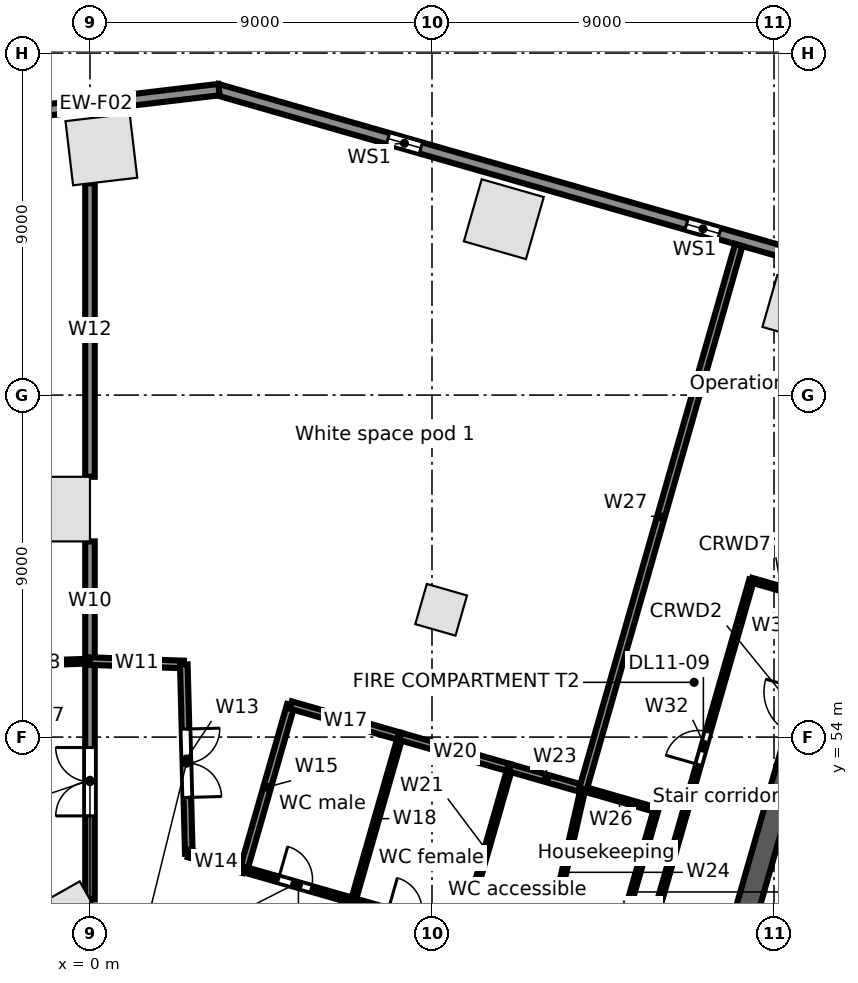
"""IFC4 building model, lengths in metres.
Left out: names, types, materials, properties, quantities, classifications, styles, units other than length and angle.
Written with IfcOpenShell. Run it as: python <this file> out.ifc"""

import sys

from ifc_helpers import new_model, si_unit, direction, frame, frame_2d, origin, origin_2d, place, context, subcontext, project, spatial, rectangle, extrude, element, fill, save


model = new_model("IFC4")
c1 = context("Model", 3, precision=1e-05, world=origin(), true_north=direction((0.0, 1.0)))
c2 = subcontext(c1, "Body", "Model", "MODEL_VIEW")
j1 = project(units=[si_unit("LENGTHUNIT", "METRE"), si_unit("PLANEANGLEUNIT", "RADIAN")], contexts=[c1])
p1 = place(None, origin())
s1 = spatial("IfcSite", under=j1, at=p1, CompositionType="ELEMENT")
p2 = place(p1, origin())
s2 = spatial("IfcBuilding", under=s1, at=p2, CompositionType="ELEMENT")
p3 = place(p2, frame((0.0, 0.0, 56.5)))
s3 = spatial("IfcBuildingStorey", under=s2, at=p3, CompositionType="ELEMENT", Elevation=56.5)
for number, where, z_axis, x_axis in (
    (1, (18.746, 65.376, 0.0), (0.0, 0.0, 1.0), (-0.961, 0.276, 0.0)),
    (2, (10.89, 67.629, 0.0), (0.0, 0.0, 1.0), (-0.961, 0.276, 0.0)),
    (3, (0.3, 69.464, 0.0), (0.0, 0.0, 1.0), (-0.993, -0.118, 0.0)),
    (4, (-0.591, 49.044, 0.0), (0.0, 0.0, 1.0), (0.87, 0.492, 0.0)),
    (5, (-0.85, 60.0, 0.0), (0.0, 0.0, 1.0), (0.0, 1.0, 0.0)),
):
    element("IfcColumn", number, at=place(p3, frame(where, z_axis=z_axis, x_axis=x_axis)), inside=s3, PredefinedType="COLUMN", context=c2, shape_type="SweptSolid", body=[
        extrude(rectangle(XDim=1.7, YDim=1.7, at=origin_2d()), origin(), (0.0, 0.0, 1.0), 5.0),
    ])
p4 = place(p3, frame((9.241, 57.35, 0.0), z_axis=(0.0, 0.0, 1.0), x_axis=(0.961261695938, -0.275637355817, 0.0)))
e6 = element("IfcColumn", 6, at=p4, inside=s3, PredefinedType="COLUMN", context=c2, shape_type="SweptSolid", body=[
    extrude(rectangle(XDim=1.1, YDim=1.1, at=origin_2d()), origin(), (0.0, 0.0, 1.0), 5.0),
])
p5 = place(p3, frame((3.335, 71.044, 0.0), z_axis=(0.0, 0.0, 1.0), x_axis=(0.961260130989, -0.275642813387, 0.0)))
e7 = element("IfcWall", 7, at=p5, inside=s3, PredefinedType="STANDARD", context=c2, shape_type="SweptSolid", body=[
    extrude(rectangle(XDim=32.741, YDim=0.3, at=frame_2d((16.371, 0.0))), origin(), (0.0, 0.0, 1.0), 4.68),
])
p6 = place(p5, frame((29.207, 0.0, 0.6)))
e8 = element("IfcOpeningElement", 8, at=p6, cuts=e7, PredefinedType="OPENING", context=c2, shape_type="SweptSolid", body=[
    extrude(rectangle(XDim=0.9, YDim=3.2, at=frame_2d((0.45, 1.6))), frame((0.0, 0.16, 0.0), z_axis=(0.0, -1.0, 0.0), x_axis=(1.0, 0.0, 0.0)), (0.0, 0.0, 1.0), 0.32),
])
p7 = place(p5, frame((21.034, 0.0, 0.6)))
e9 = element("IfcOpeningElement", 9, at=p7, cuts=e7, PredefinedType="OPENING", context=c2, shape_type="SweptSolid", body=[
    extrude(rectangle(XDim=0.9, YDim=3.2, at=frame_2d((0.45, 1.6))), frame((0.0, 0.16, 0.0), z_axis=(0.0, -1.0, 0.0), x_axis=(1.0, 0.0, 0.0)), (0.0, 0.0, 1.0), 0.32),
])
p8 = place(p5, frame((12.861, 0.0, 0.6)))
e10 = element("IfcOpeningElement", 10, at=p8, cuts=e7, PredefinedType="OPENING", context=c2, shape_type="SweptSolid", body=[
    extrude(rectangle(XDim=0.9, YDim=3.2, at=frame_2d((0.45, 1.6))), frame((0.0, 0.16, 0.0), z_axis=(0.0, -1.0, 0.0), x_axis=(1.0, 0.0, 0.0)), (0.0, 0.0, 1.0), 0.32),
])
p9 = place(p5, frame((4.688, 0.0, 0.6)))
e11 = element("IfcOpeningElement", 11, at=p9, cuts=e7, PredefinedType="OPENING", context=c2, shape_type="SweptSolid", body=[
    extrude(rectangle(XDim=0.9, YDim=3.2, at=frame_2d((0.45, 1.6))), frame((0.0, 0.16, 0.0), z_axis=(0.0, -1.0, 0.0), x_axis=(1.0, 0.0, 0.0)), (0.0, 0.0, 1.0), 0.32),
])
p10 = place(p3, frame((-3.076, 70.273, 0.0), z_axis=(0.0, 0.0, 1.0), x_axis=(0.993067743007, 0.117543429416, 0.0)))
e12 = element("IfcWall", 12, at=p10, inside=s3, PredefinedType="STANDARD", context=c2, shape_type="SweptSolid", body=[
    extrude(rectangle(XDim=6.516, YDim=0.3, at=frame_2d((3.258, 0.0))), origin(), (0.0, 0.0, 1.0), 4.68),
])
p11 = place(p3, frame((17.282, 49.427, 0.0), z_axis=(0.0, 0.0, 1.0), x_axis=(0.275631631629, 0.961263337304, 0.0)))
e13 = element("IfcWall", 13, at=p11, inside=s3, PredefinedType="SOLIDWALL", context=c2, shape_type="SweptSolid", body=[
    extrude(rectangle(XDim=10.8, YDim=0.6, at=frame_2d((5.4, 0.0))), origin(), (0.0, 0.0, 1.0), 4.68),
])
p12 = place(p11, frame((4.8, 0.0, 0.0)))
e14 = element("IfcOpeningElement", 14, at=p12, cuts=e13, PredefinedType="OPENING", context=c2, shape_type="SweptSolid", body=[
    extrude(rectangle(XDim=1.2, YDim=2.1, at=frame_2d((0.6, 1.05))), frame((0.0, 0.31, 0.0), z_axis=(0.0, -1.0, 0.0), x_axis=(1.0, 0.0, 0.0)), (0.0, 0.0, 1.0), 0.62),
])
p13 = place(p3, frame((-2.67, 55.904, 0.0), z_axis=(0.0, 0.0, 1.0), x_axis=(0.999354913865, 0.03591317494, 0.0)))
e15 = element("IfcWall", 15, at=p13, inside=s3, PredefinedType="PARTITIONING", context=c2, shape_type="SweptSolid", body=[
    extrude(rectangle(XDim=2.672, YDim=0.125, at=frame_2d((1.336, 0.0))), origin(), (0.0, 0.0, 1.0), 3.742),
])
p14 = place(p3, frame((0.0, 49.726, 0.0), z_axis=(0.0, 0.0, 1.0), x_axis=(0.0, 1.0, 0.0)))
e16 = element("IfcWall", 16, at=p14, inside=s3, PredefinedType="PARTITIONING", context=c2, shape_type="SweptSolid", body=[
    extrude(rectangle(XDim=6.274, YDim=0.25, at=frame_2d((3.137, 0.0))), origin(), (0.0, 0.0, 1.0), 4.68),
])
p15 = place(p14, frame((2.2, 0.0, 0.0)))
e17 = element("IfcOpeningElement", 17, at=p15, cuts=e16, PredefinedType="OPENING", context=c2, shape_type="SweptSolid", body=[
    extrude(rectangle(XDim=1.8, YDim=2.1, at=frame_2d((0.9, 1.05))), frame((0.0, 0.135, 0.0), z_axis=(0.0, -1.0, 0.0), x_axis=(1.0, 0.0, 0.0)), (0.0, 0.0, 1.0), 0.27),
])
p16 = place(p3, frame((0.0, 56.0, 0.0), z_axis=(0.0, 0.0, 1.0), x_axis=(0.0, 1.0, 0.0)))
e18 = element("IfcWall", 18, at=p16, inside=s3, PredefinedType="PARTITIONING", context=c2, shape_type="SweptSolid", body=[
    extrude(rectangle(XDim=3.15, YDim=0.25, at=frame_2d((1.575, 0.0))), origin(), (0.0, 0.0, 1.0), 4.68),
])
p17 = place(p3, frame((0.0, 56.0, 0.0), z_axis=(0.0, 0.0, 1.0), x_axis=(0.999349313684, -0.036068673934, 0.0)))
e19 = element("IfcWall", 19, at=p17, inside=s3, PredefinedType="PARTITIONING", context=c2, shape_type="SweptSolid", body=[
    extrude(rectangle(XDim=2.471, YDim=0.2, at=frame_2d((1.235, 0.0))), origin(), (0.0, 0.0, 1.0), 4.68),
])
p18 = place(p3, frame((0.0, 60.85, 0.0), z_axis=(0.0, 0.0, 1.0), x_axis=(0.0, 1.0, 0.0)))
e20 = element("IfcWall", 20, at=p18, inside=s3, PredefinedType="PARTITIONING", context=c2, shape_type="SweptSolid", body=[
    extrude(rectangle(XDim=7.723, YDim=0.25, at=frame_2d((3.861, 0.0))), origin(), (0.0, 0.0, 1.0), 3.952),
])
p19 = place(p3, frame((2.469, 55.911, 0.0), z_axis=(0.0, 0.0, 1.0), x_axis=(0.02651808123, -0.999648333849, 0.0)))
e21 = element("IfcWall", 21, at=p19, inside=s3, PredefinedType="PARTITIONING", context=c2, shape_type="SweptSolid", body=[
    extrude(rectangle(XDim=4.981, YDim=0.2, at=frame_2d((2.49, 0.0))), origin(), (0.0, 0.0, 1.0), 4.68),
])
p20 = place(p19, frame((1.7, 0.0, 0.0)))
e22 = element("IfcOpeningElement", 22, at=p20, cuts=e21, PredefinedType="OPENING", context=c2, shape_type="SweptSolid", body=[
    extrude(rectangle(XDim=1.8, YDim=2.1, at=frame_2d((0.9, 1.05))), frame((0.0, 0.11, 0.0), z_axis=(0.0, -1.0, 0.0), x_axis=(1.0, 0.0, 0.0)), (0.0, 0.0, 1.0), 0.22),
])
p21 = place(p3, frame((2.601, 50.932, 0.0), z_axis=(0.0, 0.0, 1.0), x_axis=(0.961197773994, -0.27586018065, 0.0)))
e23 = element("IfcWall", 23, at=p21, inside=s3, PredefinedType="PARTITIONING", context=c2, shape_type="SweptSolid", body=[
    extrude(rectangle(XDim=1.5, YDim=0.2, at=frame_2d((0.75, 0.0))), origin(), (0.0, 0.0, 1.0), 4.68),
])
p22 = place(p3, frame((4.043, 50.518, 0.0), z_axis=(0.0, 0.0, 1.0), x_axis=(0.275745553681, 0.96123066411, 0.0)))
e24 = element("IfcWall", 24, at=p22, inside=s3, PredefinedType="PARTITIONING", context=c2, shape_type="SweptSolid", body=[
    extrude(rectangle(XDim=4.5, YDim=0.2, at=frame_2d((2.25, 0.0))), origin(), (0.0, 0.0, 1.0), 4.68),
])
p23 = place(p3, frame((4.043, 50.518, 0.0), z_axis=(0.0, 0.0, 1.0), x_axis=(0.961247103494, -0.275688240636, 0.0)))
e25 = element("IfcWall", 25, at=p23, inside=s3, PredefinedType="PARTITIONING", context=c2, shape_type="SweptSolid", body=[
    extrude(rectangle(XDim=3.0, YDim=0.15, at=frame_2d((1.5, 0.0))), origin(), (0.0, 0.0, 1.0), 4.68),
])
p24 = place(p23, frame((0.95, 0.0, 0.0)))
e26 = element("IfcOpeningElement", 26, at=p24, cuts=e25, PredefinedType="OPENING", context=c2, shape_type="SweptSolid", body=[
    extrude(rectangle(XDim=0.9, YDim=2.1, at=frame_2d((0.45, 1.05))), frame((0.0, 0.085, 0.0), z_axis=(0.0, -1.0, 0.0), x_axis=(1.0, 0.0, 0.0)), (0.0, 0.0, 1.0), 0.17),
])
p25 = place(p3, frame((5.284, 54.844, 0.0), z_axis=(0.0, 0.0, 1.0), x_axis=(0.961243927922, -0.275699312717, 0.0)))
e27 = element("IfcWall", 27, at=p25, inside=s3, PredefinedType="PARTITIONING", context=c2, shape_type="SweptSolid", body=[
    extrude(rectangle(XDim=2.999, YDim=0.2, at=frame_2d((1.5, 0.0))), origin(), (0.0, 0.0, 1.0), 4.68),
])
p26 = place(p3, frame((6.927, 49.691, 0.0), z_axis=(0.0, 0.0, 1.0), x_axis=(0.275530671241, 0.961292280841, 0.0)))
e28 = element("IfcWall", 28, at=p26, inside=s3, PredefinedType="PARTITIONING", context=c2, shape_type="SweptSolid", body=[
    extrude(rectangle(XDim=4.5, YDim=0.125, at=frame_2d((2.25, 0.0))), origin(), (0.0, 0.0, 1.0), 4.68),
])
p27 = place(p3, frame((6.927, 49.691, 0.0), z_axis=(0.0, 0.0, 1.0), x_axis=(0.961268664977, -0.27561305073, 0.0)))
e29 = element("IfcWall", 29, at=p27, inside=s3, PredefinedType="PARTITIONING", context=c2, shape_type="SweptSolid", body=[
    extrude(rectangle(XDim=3.0, YDim=0.15, at=frame_2d((1.5, 0.0))), origin(), (0.0, 0.0, 1.0), 3.742),
])
p28 = place(p27, frame((0.95, 0.0, 0.0)))
e30 = element("IfcOpeningElement", 30, at=p28, cuts=e29, PredefinedType="OPENING", context=c2, shape_type="SweptSolid", body=[
    extrude(rectangle(XDim=0.9, YDim=2.1, at=frame_2d((0.45, 1.05))), frame((0.0, 0.085, 0.0), z_axis=(0.0, -1.0, 0.0), x_axis=(1.0, 0.0, 0.0)), (0.0, 0.0, 1.0), 0.17),
])
p29 = place(p3, frame((8.167, 54.017, 0.0), z_axis=(0.0, 0.0, 1.0), x_axis=(0.961247103494, -0.275688240636, 0.0)))
e31 = element("IfcWall", 31, at=p29, inside=s3, PredefinedType="PARTITIONING", context=c2, shape_type="SweptSolid", body=[
    extrude(rectangle(XDim=3.0, YDim=0.2, at=frame_2d((1.5, 0.0))), origin(), (0.0, 0.0, 1.0), 3.742),
])
p30 = place(p3, frame((9.811, 48.864, 0.0), z_axis=(0.0, 0.0, 1.0), x_axis=(0.275545040649, 0.96128816209, 0.0)))
e32 = element("IfcWall", 32, at=p30, inside=s3, PredefinedType="PARTITIONING", context=c2, shape_type="SweptSolid", body=[
    extrude(rectangle(XDim=4.5, YDim=0.125, at=frame_2d((2.25, 0.0))), origin(), (0.0, 0.0, 1.0), 4.68),
])
p31 = place(p3, frame((11.051, 53.19, 0.0), z_axis=(0.0, 0.0, 1.0), x_axis=(0.961316434736, -0.275446387355, 0.0)))
e33 = element("IfcWall", 33, at=p31, inside=s3, PredefinedType="PARTITIONING", context=c2, shape_type="SweptSolid", body=[
    extrude(rectangle(XDim=2.0, YDim=0.2, at=frame_2d((1.0, 0.0))), origin(), (0.0, 0.0, 1.0), 4.68),
])
p32 = place(p3, frame((11.973, 48.244, 0.0), z_axis=(0.0, 0.0, 1.0), x_axis=(0.222117362571, 0.975019936845, 0.0)))
e34 = element("IfcWall", 34, at=p32, inside=s3, PredefinedType="PARTITIONING", context=c2, shape_type="SweptSolid", body=[
    extrude(rectangle(XDim=4.508, YDim=0.125, at=frame_2d((2.254, 0.0))), origin(), (0.0, 0.0, 1.0), 4.68),
])
p33 = place(p3, frame((12.974, 52.639, 0.0), z_axis=(0.0, 0.0, 1.0), x_axis=(0.961270097305, -0.275608055084, 0.0)))
e35 = element("IfcWall", 35, at=p33, inside=s3, PredefinedType="PARTITIONING", context=c2, shape_type="SweptSolid", body=[
    extrude(rectangle(XDim=1.999, YDim=0.125, at=frame_2d((1.0, 0.0))), origin(), (0.0, 0.0, 1.0), 4.68),
])
p34 = place(p3, frame((12.974, 52.639, 0.0), z_axis=(0.0, 0.0, 1.0), x_axis=(0.275299463768, 0.961358520662, 0.0)))
e36 = element("IfcWall", 36, at=p34, inside=s3, PredefinedType="PARTITIONING", context=c2, shape_type="SweptSolid", body=[
    extrude(rectangle(XDim=14.885, YDim=0.2, at=frame_2d((7.443, 0.0))), origin(), (0.0, 0.0, 1.0), 3.742),
])
p35 = place(p3, frame((13.656, 47.762, 0.0), z_axis=(0.0, 0.0, 1.0), x_axis=(0.275545040649, 0.96128816209, 0.0)))
e37 = element("IfcWall", 37, at=p35, inside=s3, PredefinedType="PARTITIONING", context=c2, shape_type="SweptSolid", body=[
    extrude(rectangle(XDim=4.5, YDim=0.125, at=frame_2d((2.25, 0.0))), origin(), (0.0, 0.0, 1.0), 4.68),
])
p36 = place(p3, frame((14.928, 49.478, 0.0), z_axis=(0.0, 0.0, 1.0), x_axis=(0.275674053528, 0.961251172281, 0.0)))
e38 = element("IfcWall", 38, at=p36, inside=s3, PredefinedType="PARTITIONING", context=c2, shape_type="SweptSolid", body=[
    extrude(rectangle(XDim=9.0, YDim=0.125, at=frame_2d((4.5, 0.0))), origin(), (0.0, 0.0, 1.0), 3.742),
])
p37 = place(p36, frame((3.95, 0.0, 0.0)))
e39 = element("IfcOpeningElement", 39, at=p37, cuts=e38, PredefinedType="OPENING", context=c2, shape_type="SweptSolid", body=[
    extrude(rectangle(XDim=0.9, YDim=2.1, at=frame_2d((0.45, 1.05))), frame((0.0, 0.073, 0.0), z_axis=(0.0, -1.0, 0.0), x_axis=(1.0, 0.0, 0.0)), (0.0, 0.0, 1.0), 0.145),
])
p38 = place(p3, frame((17.409, 58.129, 0.0), z_axis=(0.0, 0.0, 1.0), x_axis=(0.961253165474, -0.275667103345, 0.0)))
e40 = element("IfcWall", 40, at=p38, inside=s3, PredefinedType="PARTITIONING", context=c2, shape_type="SweptSolid", body=[
    extrude(rectangle(XDim=1.977, YDim=0.125, at=frame_2d((0.988, 0.0))), origin(), (0.0, 0.0, 1.0), 4.68),
])
p39 = place(p8, origin())
e41 = element("IfcWindow", 41, at=p39, inside=s3, PartitioningType="SINGLE_PANEL", PredefinedType="WINDOW", context=c2, shape_type="SweptSolid", body=[
    extrude(rectangle(XDim=0.9, YDim=3.2, at=frame_2d((0.45, 1.6))), frame((0.0, 0.03, 0.0), z_axis=(0.0, -1.0, 0.0), x_axis=(1.0, 0.0, 0.0)), (0.0, 0.0, 1.0), 0.06),
])
fill(e10, e41)
p40 = place(p9, origin())
e42 = element("IfcWindow", 42, at=p40, inside=s3, PartitioningType="SINGLE_PANEL", PredefinedType="WINDOW", context=c2, shape_type="SweptSolid", body=[
    extrude(rectangle(XDim=0.9, YDim=3.2, at=frame_2d((0.45, 1.6))), frame((0.0, 0.03, 0.0), z_axis=(0.0, -1.0, 0.0), x_axis=(1.0, 0.0, 0.0)), (0.0, 0.0, 1.0), 0.06),
])
fill(e11, e42)
p41 = place(p24, origin())
e43 = element("IfcDoor", 43, at=p41, inside=s3, OperationType="SINGLE_SWING_LEFT", PredefinedType="DOOR", context=c2, shape_type="SweptSolid", body=[
    extrude(rectangle(XDim=0.9, YDim=2.1, at=frame_2d((0.45, 1.05))), frame((0.0, 0.025, 0.0), z_axis=(0.0, -1.0, 0.0), x_axis=(1.0, 0.0, 0.0)), (0.0, 0.0, 1.0), 0.05),
])
fill(e26, e43)
p42 = place(p20, origin())
e44 = element("IfcDoor", 44, at=p42, inside=s3, OperationType="DOUBLE_DOOR_SINGLE_SWING", PredefinedType="DOOR", context=c2, shape_type="SweptSolid", body=[
    extrude(rectangle(XDim=1.8, YDim=2.1, at=frame_2d((0.9, 1.05))), frame((0.0, 0.025, 0.0), z_axis=(0.0, -1.0, 0.0), x_axis=(1.0, 0.0, 0.0)), (0.0, 0.0, 1.0), 0.05),
])
fill(e22, e44)
p43 = place(p37, origin())
e45 = element("IfcDoor", 45, at=p43, inside=s3, OperationType="SINGLE_SWING_LEFT", PredefinedType="DOOR", context=c2, shape_type="SweptSolid", body=[
    extrude(rectangle(XDim=0.9, YDim=2.1, at=frame_2d((0.45, 1.05))), frame((0.0, 0.025, 0.0), z_axis=(0.0, -1.0, 0.0), x_axis=(1.0, 0.0, 0.0)), (0.0, 0.0, 1.0), 0.05),
])
fill(e39, e45)
p44 = place(p15, origin())
e46 = element("IfcDoor", 46, at=p44, inside=s3, OperationType="DOUBLE_DOOR_SINGLE_SWING", PredefinedType="DOOR", context=c2, shape_type="SweptSolid", body=[
    extrude(rectangle(XDim=1.8, YDim=2.1, at=frame_2d((0.9, 1.05))), frame((0.0, 0.025, 0.0), z_axis=(0.0, -1.0, 0.0), x_axis=(1.0, 0.0, 0.0)), (0.0, 0.0, 1.0), 0.05),
])
fill(e17, e46)
save(model, sys.argv[1])
